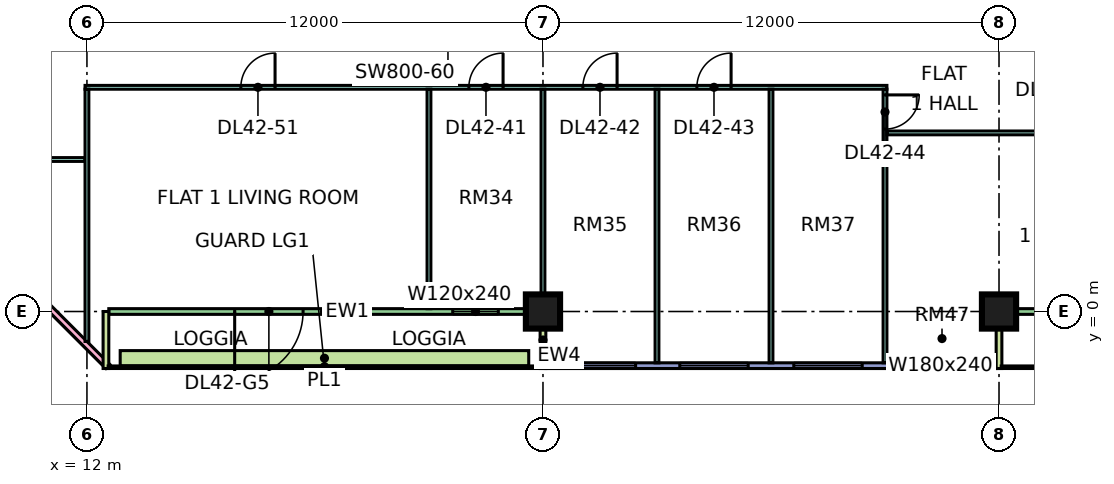
"""IFC4 building model, lengths in metres.
Left out: names, types, materials, properties, quantities, classifications, styles, units other than length and angle.
Written with IfcOpenShell. Run it as: python <this file> out.ifc"""

import sys

from ifc_helpers import new_model, si_unit, direction, frame, frame_2d, origin, origin_2d, place, context, subcontext, project, spatial, rectangle, extrude, element, fill, save


model = new_model("IFC4")
c1 = context("Model", 3, precision=1e-05, world=origin(), true_north=direction((0.0, 1.0)))
c2 = subcontext(c1, "Body", "Model", "MODEL_VIEW")
j1 = project(units=[si_unit("LENGTHUNIT", "METRE"), si_unit("PLANEANGLEUNIT", "RADIAN")], contexts=[c1])
p1 = place(None, origin())
s1 = spatial("IfcSite", under=j1, at=p1, CompositionType="ELEMENT")
p2 = place(p1, origin())
s2 = spatial("IfcBuilding", under=s1, at=p2, CompositionType="ELEMENT")
p3 = place(p2, frame((0.0, 0.0, 183.65)))
s3 = spatial("IfcBuildingStorey", under=s2, at=p3, CompositionType="ELEMENT", Elevation=183.65)
for number, where, z_axis, x_axis in (
    (1, (24.0, 0.0, 0.0), (0.0, 0.0, 1.0), (1.0, 0.0, 0.0)),
    (2, (36.0, 0.0, 0.0), (0.0, 0.0, 1.0), (1.0, 0.0, 0.0)),
):
    element("IfcColumn", number, at=place(p3, frame(where, z_axis=z_axis, x_axis=x_axis)), inside=s3, PredefinedType="COLUMN", context=c2, shape_type="SweptSolid", body=[
        extrude(rectangle(XDim=0.9, YDim=0.9, at=origin_2d()), origin(), (0.0, 0.0, 1.0), 3.75),
    ])
p4 = place(p3, frame((-1.447, 12.553, 0.0), z_axis=(0.0, 0.0, 1.0), x_axis=(0.707106781187, -0.707106781187, 0.0)))
e3 = element("IfcWall", 3, at=p4, inside=s3, PredefinedType="SOLIDWALL", context=c2, shape_type="SweptSolid", body=[
    extrude(rectangle(XDim=19.799, YDim=0.15, at=frame_2d((9.899, 0.0))), origin(), (0.0, 0.0, 1.0), 3.35),
])
p5 = place(p4, frame((2.212, 0.0, 0.45)))
e4 = element("IfcOpeningElement", 4, at=p5, cuts=e3, PredefinedType="OPENING", context=c2, shape_type="SweptSolid", body=[
    extrude(rectangle(XDim=3.0, YDim=2.4, at=frame_2d((1.5, 1.2))), frame((0.0, 0.085, 0.0), z_axis=(0.0, -1.0, 0.0), x_axis=(1.0, 0.0, 0.0)), (0.0, 0.0, 1.0), 0.17),
])
p6 = place(p4, frame((10.216, 0.0, 0.45)))
e5 = element("IfcOpeningElement", 5, at=p6, cuts=e3, PredefinedType="OPENING", context=c2, shape_type="SweptSolid", body=[
    extrude(rectangle(XDim=3.0, YDim=2.4, at=frame_2d((1.5, 1.2))), frame((0.0, 0.085, 0.0), z_axis=(0.0, -1.0, 0.0), x_axis=(1.0, 0.0, 0.0)), (0.0, 0.0, 1.0), 0.17),
])
p7 = place(p3, frame((12.575, 0.0, 0.0), z_axis=(0.0, 0.0, 1.0), x_axis=(1.0, 0.0, 0.0)))
e6 = element("IfcWall", 6, at=p7, inside=s3, PredefinedType="SOLIDWALL", context=c2, shape_type="SweptSolid", body=[
    extrude(rectangle(XDim=11.35, YDim=0.15, at=frame_2d((5.675, 0.0))), origin(), (0.0, 0.0, 1.0), 3.35),
])
p8 = place(p7, frame((3.312, 0.0, 0.0)))
e7 = element("IfcOpeningElement", 7, at=p8, cuts=e6, PredefinedType="OPENING", context=c2, shape_type="SweptSolid", body=[
    extrude(rectangle(XDim=1.8, YDim=2.4, at=frame_2d((0.9, 1.2))), frame((0.0, 0.085, 0.0), z_axis=(0.0, -1.0, 0.0), x_axis=(1.0, 0.0, 0.0)), (0.0, 0.0, 1.0), 0.17),
])
p9 = place(p7, frame((9.05, 0.0, 0.45)))
e8 = element("IfcOpeningElement", 8, at=p9, cuts=e6, PredefinedType="OPENING", context=c2, shape_type="SweptSolid", body=[
    extrude(rectangle(XDim=1.2, YDim=2.4, at=frame_2d((0.6, 1.2))), frame((0.0, 0.085, 0.0), z_axis=(0.0, -1.0, 0.0), x_axis=(1.0, 0.0, 0.0)), (0.0, 0.0, 1.0), 0.17),
])
for number, where, z_axis, x_axis in (
    (9, (12.5, -1.5, 0.0), (0.0, 0.0, 1.0), (0.0, 1.0, 0.0)),
    (10, (24.0, -1.5, 0.0), (0.0, 0.0, 1.0), (0.0, 1.0, 0.0)),
):
    element("IfcWall", number, at=place(p3, frame(where, z_axis=z_axis, x_axis=x_axis)), inside=s3, PredefinedType="SOLIDWALL", context=c2, shape_type="SweptSolid", body=[
        extrude(rectangle(XDim=1.5, YDim=0.15, at=frame_2d((0.75, 0.0))), origin(), (0.0, 0.0, 1.0), 3.35),
    ])
p10 = place(p3, frame((24.075, -1.425, 0.0), z_axis=(0.0, 0.0, 1.0), x_axis=(1.0, 0.0, 0.0)))
e11 = element("IfcWall", 11, at=p10, inside=s3, PredefinedType="SOLIDWALL", context=c2, shape_type="SweptSolid", body=[
    extrude(rectangle(XDim=11.85, YDim=0.15, at=frame_2d((5.925, 0.0))), origin(), (0.0, 0.0, 1.0), 3.35),
])
p11 = place(p10, frame((0.562, 0.0, 0.45)))
e12 = element("IfcOpeningElement", 12, at=p11, cuts=e11, PredefinedType="OPENING", context=c2, shape_type="SweptSolid", body=[
    extrude(rectangle(XDim=1.8, YDim=2.4, at=frame_2d((0.9, 1.2))), frame((0.0, 0.085, 0.0), z_axis=(0.0, -1.0, 0.0), x_axis=(1.0, 0.0, 0.0)), (0.0, 0.0, 1.0), 0.17),
])
p12 = place(p10, frame((3.525, 0.0, 0.45)))
e13 = element("IfcOpeningElement", 13, at=p12, cuts=e11, PredefinedType="OPENING", context=c2, shape_type="SweptSolid", body=[
    extrude(rectangle(XDim=1.8, YDim=2.4, at=frame_2d((0.9, 1.2))), frame((0.0, 0.085, 0.0), z_axis=(0.0, -1.0, 0.0), x_axis=(1.0, 0.0, 0.0)), (0.0, 0.0, 1.0), 0.17),
])
p13 = place(p10, frame((6.525, 0.0, 0.45)))
e14 = element("IfcOpeningElement", 14, at=p13, cuts=e11, PredefinedType="OPENING", context=c2, shape_type="SweptSolid", body=[
    extrude(rectangle(XDim=1.8, YDim=2.4, at=frame_2d((0.9, 1.2))), frame((0.0, 0.085, 0.0), z_axis=(0.0, -1.0, 0.0), x_axis=(1.0, 0.0, 0.0)), (0.0, 0.0, 1.0), 0.17),
])
p14 = place(p10, frame((9.488, 0.0, 0.45)))
e15 = element("IfcOpeningElement", 15, at=p14, cuts=e11, PredefinedType="OPENING", context=c2, shape_type="SweptSolid", body=[
    extrude(rectangle(XDim=1.8, YDim=2.4, at=frame_2d((0.9, 1.2))), frame((0.0, 0.085, 0.0), z_axis=(0.0, -1.0, 0.0), x_axis=(1.0, 0.0, 0.0)), (0.0, 0.0, 1.0), 0.17),
])
p15 = place(p3, frame((36.075, 0.0, 0.0), z_axis=(0.0, 0.0, 1.0), x_axis=(1.0, 0.0, 0.0)))
e16 = element("IfcWall", 16, at=p15, inside=s3, PredefinedType="SOLIDWALL", context=c2, shape_type="SweptSolid", body=[
    extrude(rectangle(XDim=11.85, YDim=0.15, at=frame_2d((5.925, 0.0))), origin(), (0.0, 0.0, 1.0), 3.35),
])
p16 = place(p15, frame((2.3, 0.0, 0.0)))
e17 = element("IfcOpeningElement", 17, at=p16, cuts=e16, PredefinedType="OPENING", context=c2, shape_type="SweptSolid", body=[
    extrude(rectangle(XDim=1.8, YDim=2.4, at=frame_2d((0.9, 1.2))), frame((0.0, 0.085, 0.0), z_axis=(0.0, -1.0, 0.0), x_axis=(1.0, 0.0, 0.0)), (0.0, 0.0, 1.0), 0.17),
])
p17 = place(p15, frame((6.55, 0.0, 0.45)))
e18 = element("IfcOpeningElement", 18, at=p17, cuts=e16, PredefinedType="OPENING", context=c2, shape_type="SweptSolid", body=[
    extrude(rectangle(XDim=1.2, YDim=2.4, at=frame_2d((0.6, 1.2))), frame((0.0, 0.085, 0.0), z_axis=(0.0, -1.0, 0.0), x_axis=(1.0, 0.0, 0.0)), (0.0, 0.0, 1.0), 0.17),
])
p18 = place(p15, frame((10.062, 0.0, 0.45)))
e19 = element("IfcOpeningElement", 19, at=p18, cuts=e16, PredefinedType="OPENING", context=c2, shape_type="SweptSolid", body=[
    extrude(rectangle(XDim=1.2, YDim=2.4, at=frame_2d((0.6, 1.2))), frame((0.0, 0.085, 0.0), z_axis=(0.0, -1.0, 0.0), x_axis=(1.0, 0.0, 0.0)), (0.0, 0.0, 1.0), 0.17),
])
p19 = place(p3, frame((36.0, -1.5, 0.0), z_axis=(0.0, 0.0, 1.0), x_axis=(0.0, 1.0, 0.0)))
e20 = element("IfcWall", 20, at=p19, inside=s3, PredefinedType="SOLIDWALL", context=c2, shape_type="SweptSolid", body=[
    extrude(rectangle(XDim=1.5, YDim=0.15, at=frame_2d((0.75, 0.0))), origin(), (0.0, 0.0, 1.0), 3.35),
])
p20 = place(p3, frame((12.875, -1.229, 0.0), z_axis=(0.0, 0.0, 1.0), x_axis=(1.0, 0.0, 0.0)))
e21 = element("IfcWall", 21, at=p20, inside=s3, PredefinedType="SOLIDWALL", context=c2, shape_type="SweptSolid", body=[
    extrude(rectangle(XDim=10.75, YDim=0.4, at=frame_2d((5.375, 0.0))), origin(), (0.0, 0.0, 1.0), 0.7),
])
p21 = place(p3, frame((9.05, 4.0, 0.0), z_axis=(0.0, 0.0, 1.0), x_axis=(1.0, 0.0, 0.0)))
e22 = element("IfcWall", 22, at=p21, inside=s3, PredefinedType="PARTITIONING", context=c2, shape_type="SweptSolid", body=[
    extrude(rectangle(XDim=2.9, YDim=0.1, at=frame_2d((1.45, 0.0))), origin(), (0.0, 0.0, 1.0), 3.35),
])
p22 = place(p3, frame((11.95, 5.9, 0.0), z_axis=(0.0, 0.0, 1.0), x_axis=(1.0, 0.0, 0.0)))
e23 = element("IfcWall", 23, at=p22, inside=s3, PredefinedType="PARTITIONING", context=c2, shape_type="SweptSolid", body=[
    extrude(rectangle(XDim=21.1, YDim=0.1, at=frame_2d((10.55, 0.0))), origin(), (0.0, 0.0, 1.0), 3.35),
])
p23 = place(p22, frame((10.1, 0.0, 0.0)))
e24 = element("IfcOpeningElement", 24, at=p23, cuts=e23, PredefinedType="OPENING", context=c2, shape_type="SweptSolid", body=[
    extrude(rectangle(XDim=0.9, YDim=2.1, at=frame_2d((0.45, 1.05))), frame((0.0, 0.06, 0.0), z_axis=(0.0, -1.0, 0.0), x_axis=(1.0, 0.0, 0.0)), (0.0, 0.0, 1.0), 0.12),
])
p24 = place(p22, frame((13.1, 0.0, 0.0)))
e25 = element("IfcOpeningElement", 25, at=p24, cuts=e23, PredefinedType="OPENING", context=c2, shape_type="SweptSolid", body=[
    extrude(rectangle(XDim=0.9, YDim=2.1, at=frame_2d((0.45, 1.05))), frame((0.0, 0.06, 0.0), z_axis=(0.0, -1.0, 0.0), x_axis=(1.0, 0.0, 0.0)), (0.0, 0.0, 1.0), 0.12),
])
p25 = place(p22, frame((16.1, 0.0, 0.0)))
e26 = element("IfcOpeningElement", 26, at=p25, cuts=e23, PredefinedType="OPENING", context=c2, shape_type="SweptSolid", body=[
    extrude(rectangle(XDim=0.9, YDim=2.1, at=frame_2d((0.45, 1.05))), frame((0.0, 0.06, 0.0), z_axis=(0.0, -1.0, 0.0), x_axis=(1.0, 0.0, 0.0)), (0.0, 0.0, 1.0), 0.12),
])
p26 = place(p22, frame((4.1, 0.0, 0.0)))
e27 = element("IfcOpeningElement", 27, at=p26, cuts=e23, PredefinedType="OPENING", context=c2, shape_type="SweptSolid", body=[
    extrude(rectangle(XDim=0.9, YDim=2.1, at=frame_2d((0.45, 1.05))), frame((0.0, 0.06, 0.0), z_axis=(0.0, -1.0, 0.0), x_axis=(1.0, 0.0, 0.0)), (0.0, 0.0, 1.0), 0.12),
])
p27 = place(p3, frame((12.0, -0.788, 0.0), z_axis=(0.0, 0.0, 1.0), x_axis=(0.0, 1.0, 0.0)))
e28 = element("IfcWall", 28, at=p27, inside=s3, PredefinedType="PARTITIONING", context=c2, shape_type="SweptSolid", body=[
    extrude(rectangle(XDim=6.638, YDim=0.1, at=frame_2d((3.319, 0.0))), origin(), (0.0, 0.0, 1.0), 3.35),
])
p28 = place(p3, frame((21.0, 0.074, 0.0), z_axis=(0.0, 0.0, 1.0), x_axis=(0.0, 1.0, 0.0)))
e29 = element("IfcWall", 29, at=p28, inside=s3, PredefinedType="PARTITIONING", context=c2, shape_type="SweptSolid", body=[
    extrude(rectangle(XDim=5.776, YDim=0.1, at=frame_2d((2.888, 0.0))), origin(), (0.0, 0.0, 1.0), 3.35),
])
p29 = place(p3, frame((24.0, 0.0, 0.0), z_axis=(0.0, 0.0, 1.0), x_axis=(0.0, 1.0, 0.0)))
e30 = element("IfcWall", 30, at=p29, inside=s3, PredefinedType="PARTITIONING", context=c2, shape_type="SweptSolid", body=[
    extrude(rectangle(XDim=5.85, YDim=0.1, at=frame_2d((2.925, 0.0))), origin(), (0.0, 0.0, 1.0), 3.35),
])
for number, where, z_axis, x_axis in (
    (31, (27.0, -1.351, 0.0), (0.0, 0.0, 1.0), (0.0, 1.0, 0.0)),
    (32, (30.0, -1.351, 0.0), (0.0, 0.0, 1.0), (0.0, 1.0, 0.0)),
):
    element("IfcWall", number, at=place(p3, frame(where, z_axis=z_axis, x_axis=x_axis)), inside=s3, PredefinedType="PARTITIONING", context=c2, shape_type="SweptSolid", body=[
        extrude(rectangle(XDim=7.201, YDim=0.1, at=frame_2d((3.601, 0.0))), origin(), (0.0, 0.0, 1.0), 3.35),
    ])
p30 = place(p3, frame((33.0, -1.35, 0.0), z_axis=(0.0, 0.0, 1.0), x_axis=(0.0, 1.0, 0.0)))
e33 = element("IfcWall", 33, at=p30, inside=s3, PredefinedType="PARTITIONING", context=c2, shape_type="SweptSolid", body=[
    extrude(rectangle(XDim=7.2, YDim=0.1, at=frame_2d((3.6, 0.0))), origin(), (0.0, 0.0, 1.0), 3.35),
])
p31 = place(p30, frame((6.15, 0.0, 0.0)))
e34 = element("IfcOpeningElement", 34, at=p31, cuts=e33, PredefinedType="OPENING", context=c2, shape_type="SweptSolid", body=[
    extrude(rectangle(XDim=0.9, YDim=2.1, at=frame_2d((0.45, 1.05))), frame((0.0, 0.06, 0.0), z_axis=(0.0, -1.0, 0.0), x_axis=(1.0, 0.0, 0.0)), (0.0, 0.0, 1.0), 0.12),
])
p32 = place(p3, frame((33.05, 4.7, 0.0), z_axis=(0.0, 0.0, 1.0), x_axis=(1.0, 0.0, 0.0)))
e35 = element("IfcWall", 35, at=p32, inside=s3, PredefinedType="PARTITIONING", context=c2, shape_type="SweptSolid", body=[
    extrude(rectangle(XDim=14.85, YDim=0.1, at=frame_2d((7.425, 0.0))), origin(), (0.0, 0.0, 1.0), 3.35),
])
p33 = place(p32, frame((10.0, 0.0, 0.0)))
e36 = element("IfcOpeningElement", 36, at=p33, cuts=e35, PredefinedType="OPENING", context=c2, shape_type="SweptSolid", body=[
    extrude(rectangle(XDim=0.9, YDim=2.1, at=frame_2d((0.45, 1.05))), frame((0.0, 0.06, 0.0), z_axis=(0.0, -1.0, 0.0), x_axis=(1.0, 0.0, 0.0)), (0.0, 0.0, 1.0), 0.12),
])
p34 = place(p32, frame((13.0, 0.0, 0.0)))
e37 = element("IfcOpeningElement", 37, at=p34, cuts=e35, PredefinedType="OPENING", context=c2, shape_type="SweptSolid", body=[
    extrude(rectangle(XDim=0.9, YDim=2.1, at=frame_2d((0.45, 1.05))), frame((0.0, 0.06, 0.0), z_axis=(0.0, -1.0, 0.0), x_axis=(1.0, 0.0, 0.0)), (0.0, 0.0, 1.0), 0.12),
])
p35 = place(p32, frame((4.0, 0.0, 0.0)))
e38 = element("IfcOpeningElement", 38, at=p35, cuts=e35, PredefinedType="OPENING", context=c2, shape_type="SweptSolid", body=[
    extrude(rectangle(XDim=0.9, YDim=2.1, at=frame_2d((0.45, 1.05))), frame((0.0, 0.06, 0.0), z_axis=(0.0, -1.0, 0.0), x_axis=(1.0, 0.0, 0.0)), (0.0, 0.0, 1.0), 0.12),
])
p36 = place(p8, frame((1.8, 0.0, 0.0), z_axis=(0.0, 0.0, 1.0), x_axis=(-1.0, 0.0, 0.0)))
e39 = element("IfcDoor", 39, at=p36, inside=s3, OperationType="DOUBLE_DOOR_SINGLE_SWING", PredefinedType="DOOR", context=c2, shape_type="SweptSolid", body=[
    extrude(rectangle(XDim=1.8, YDim=2.4, at=frame_2d((0.9, 1.2))), frame((0.0, 0.025, 0.0), z_axis=(0.0, -1.0, 0.0), x_axis=(1.0, 0.0, 0.0)), (0.0, 0.0, 1.0), 0.05),
])
fill(e7, e39)
p37 = place(p9, origin())
e40 = element("IfcWindow", 40, at=p37, inside=s3, PartitioningType="SINGLE_PANEL", PredefinedType="WINDOW", context=c2, shape_type="SweptSolid", body=[
    extrude(rectangle(XDim=1.2, YDim=2.4, at=frame_2d((0.6, 1.2))), frame((0.0, 0.03, 0.0), z_axis=(0.0, -1.0, 0.0), x_axis=(1.0, 0.0, 0.0)), (0.0, 0.0, 1.0), 0.06),
])
fill(e8, e40)
p38 = place(p11, origin())
e41 = element("IfcWindow", 41, at=p38, inside=s3, PartitioningType="SINGLE_PANEL", PredefinedType="WINDOW", context=c2, shape_type="SweptSolid", body=[
    extrude(rectangle(XDim=1.8, YDim=2.4, at=frame_2d((0.9, 1.2))), frame((0.0, 0.03, 0.0), z_axis=(0.0, -1.0, 0.0), x_axis=(1.0, 0.0, 0.0)), (0.0, 0.0, 1.0), 0.06),
])
fill(e12, e41)
p39 = place(p12, origin())
e42 = element("IfcWindow", 42, at=p39, inside=s3, PartitioningType="SINGLE_PANEL", PredefinedType="WINDOW", context=c2, shape_type="SweptSolid", body=[
    extrude(rectangle(XDim=1.8, YDim=2.4, at=frame_2d((0.9, 1.2))), frame((0.0, 0.03, 0.0), z_axis=(0.0, -1.0, 0.0), x_axis=(1.0, 0.0, 0.0)), (0.0, 0.0, 1.0), 0.06),
])
fill(e13, e42)
p40 = place(p13, origin())
e43 = element("IfcWindow", 43, at=p40, inside=s3, PartitioningType="SINGLE_PANEL", PredefinedType="WINDOW", context=c2, shape_type="SweptSolid", body=[
    extrude(rectangle(XDim=1.8, YDim=2.4, at=frame_2d((0.9, 1.2))), frame((0.0, 0.03, 0.0), z_axis=(0.0, -1.0, 0.0), x_axis=(1.0, 0.0, 0.0)), (0.0, 0.0, 1.0), 0.06),
])
fill(e14, e43)
p41 = place(p14, origin())
e44 = element("IfcWindow", 44, at=p41, inside=s3, PartitioningType="SINGLE_PANEL", PredefinedType="WINDOW", context=c2, shape_type="SweptSolid", body=[
    extrude(rectangle(XDim=1.8, YDim=2.4, at=frame_2d((0.9, 1.2))), frame((0.0, 0.03, 0.0), z_axis=(0.0, -1.0, 0.0), x_axis=(1.0, 0.0, 0.0)), (0.0, 0.0, 1.0), 0.06),
])
fill(e15, e44)
p42 = place(p23, frame((0.9, 0.0, 0.0), z_axis=(0.0, 0.0, 1.0), x_axis=(-1.0, 0.0, 0.0)))
e45 = element("IfcDoor", 45, at=p42, inside=s3, OperationType="SINGLE_SWING_RIGHT", PredefinedType="DOOR", context=c2, shape_type="SweptSolid", body=[
    extrude(rectangle(XDim=0.9, YDim=2.1, at=frame_2d((0.45, 1.05))), frame((0.0, 0.025, 0.0), z_axis=(0.0, -1.0, 0.0), x_axis=(1.0, 0.0, 0.0)), (0.0, 0.0, 1.0), 0.05),
])
fill(e24, e45)
p43 = place(p24, frame((0.9, 0.0, 0.0), z_axis=(0.0, 0.0, 1.0), x_axis=(-1.0, 0.0, 0.0)))
e46 = element("IfcDoor", 46, at=p43, inside=s3, OperationType="SINGLE_SWING_RIGHT", PredefinedType="DOOR", context=c2, shape_type="SweptSolid", body=[
    extrude(rectangle(XDim=0.9, YDim=2.1, at=frame_2d((0.45, 1.05))), frame((0.0, 0.025, 0.0), z_axis=(0.0, -1.0, 0.0), x_axis=(1.0, 0.0, 0.0)), (0.0, 0.0, 1.0), 0.05),
])
fill(e25, e46)
p44 = place(p25, frame((0.9, 0.0, 0.0), z_axis=(0.0, 0.0, 1.0), x_axis=(-1.0, 0.0, 0.0)))
e47 = element("IfcDoor", 47, at=p44, inside=s3, OperationType="SINGLE_SWING_RIGHT", PredefinedType="DOOR", context=c2, shape_type="SweptSolid", body=[
    extrude(rectangle(XDim=0.9, YDim=2.1, at=frame_2d((0.45, 1.05))), frame((0.0, 0.025, 0.0), z_axis=(0.0, -1.0, 0.0), x_axis=(1.0, 0.0, 0.0)), (0.0, 0.0, 1.0), 0.05),
])
fill(e26, e47)
p45 = place(p31, origin())
e48 = element("IfcDoor", 48, at=p45, inside=s3, OperationType="SINGLE_SWING_RIGHT", PredefinedType="DOOR", context=c2, shape_type="SweptSolid", body=[
    extrude(rectangle(XDim=0.9, YDim=2.1, at=frame_2d((0.45, 1.05))), frame((0.0, 0.025, 0.0), z_axis=(0.0, -1.0, 0.0), x_axis=(1.0, 0.0, 0.0)), (0.0, 0.0, 1.0), 0.05),
])
fill(e34, e48)
p46 = place(p26, frame((0.9, 0.0, 0.0), z_axis=(0.0, 0.0, 1.0), x_axis=(-1.0, 0.0, 0.0)))
e49 = element("IfcDoor", 49, at=p46, inside=s3, OperationType="SINGLE_SWING_RIGHT", PredefinedType="DOOR", context=c2, shape_type="SweptSolid", body=[
    extrude(rectangle(XDim=0.9, YDim=2.1, at=frame_2d((0.45, 1.05))), frame((0.0, 0.025, 0.0), z_axis=(0.0, -1.0, 0.0), x_axis=(1.0, 0.0, 0.0)), (0.0, 0.0, 1.0), 0.05),
])
fill(e27, e49)
save(model, sys.argv[1])
